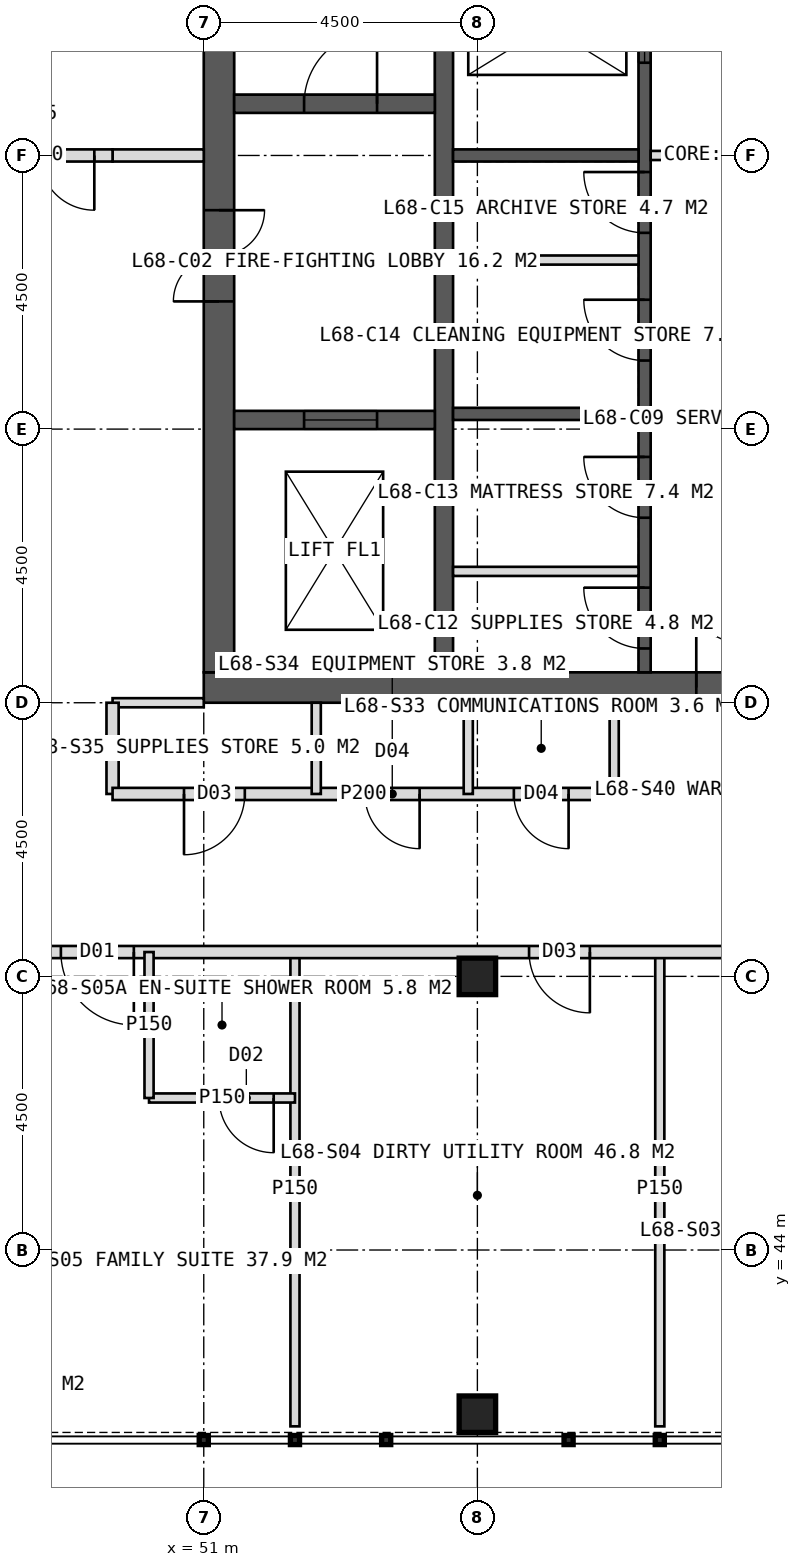
"""IFC4 building model, lengths in metres.
Left out: names, types, materials, properties, quantities, classifications, styles, units other than length and angle.
Written with IfcOpenShell. Run it as: python <this file> out.ifc"""

import sys

from ifc_helpers import new_model, si_unit, direction, frame, frame_2d, origin, origin_2d, place, context, subcontext, project, spatial, rectangle, hollow_rectangle, extrude, element, fill, save


model = new_model("IFC4")
c1 = context("Model", 3, precision=1e-05, world=origin(), true_north=direction((0.0, 1.0)))
c2 = subcontext(c1, "Body", "Model", "MODEL_VIEW")
j1 = project(units=[si_unit("LENGTHUNIT", "METRE"), si_unit("PLANEANGLEUNIT", "RADIAN")], contexts=[c1])
p1 = place(None, origin())
s1 = spatial("IfcSite", under=j1, at=p1, CompositionType="ELEMENT")
p2 = place(p1, origin())
s2 = spatial("IfcBuilding", under=s1, at=p2, CompositionType="ELEMENT")
p3 = place(p2, frame((0.0, 0.0, 282.0)))
s3 = spatial("IfcBuildingStorey", under=s2, at=p3, CompositionType="ELEMENT", Elevation=282.0)
p4 = place(p3, frame((51.0, 53.25, 0.0), z_axis=(0.0, 0.0, 1.0), x_axis=(1.0, 0.0, 0.0)))
e1 = element("IfcWall", 1, at=p4, inside=s3, PredefinedType="SHEAR", context=c2, shape_type="SweptSolid", body=[
    extrude(rectangle(XDim=18.0, YDim=0.5, at=frame_2d((9.0, 0.0))), origin(), (0.0, 0.0, 1.0), 4.0),
])
p5 = place(p4, frame((8.1, 0.0, 0.0)))
e2 = element("IfcOpeningElement", 2, at=p5, cuts=e1, PredefinedType="OPENING", context=c2, shape_type="SweptSolid", body=[
    extrude(rectangle(XDim=1.8, YDim=2.2, at=frame_2d((0.9, 1.1))), frame((0.0, 0.26, 0.0), z_axis=(0.0, -1.0, 0.0), x_axis=(1.0, 0.0, 0.0)), (0.0, 0.0, 1.0), 0.52),
])
p6 = place(p3, frame((51.25, 53.5, 0.0), z_axis=(0.0, 0.0, 1.0), x_axis=(0.0, 1.0, 0.0)))
e3 = element("IfcWall", 3, at=p6, inside=s3, PredefinedType="SHEAR", context=c2, shape_type="SweptSolid", body=[
    extrude(rectangle(XDim=17.0, YDim=0.5, at=frame_2d((8.5, 0.0))), origin(), (0.0, 0.0, 1.0), 4.0),
])
p7 = place(p6, frame((6.1, 0.0, 0.0)))
e4 = element("IfcOpeningElement", 4, at=p7, cuts=e3, PredefinedType="OPENING", context=c2, shape_type="SweptSolid", body=[
    extrude(rectangle(XDim=1.5, YDim=2.2, at=frame_2d((0.75, 1.1))), frame((0.0, 0.26, 0.0), z_axis=(0.0, -1.0, 0.0), x_axis=(1.0, 0.0, 0.0)), (0.0, 0.0, 1.0), 0.52),
])
p8 = place(p3, frame((54.95, 53.5, 0.0), z_axis=(0.0, 0.0, 1.0), x_axis=(0.0, 1.0, 0.0)))
e5 = element("IfcWall", 5, at=p8, inside=s3, PredefinedType="SHEAR", context=c2, shape_type="SweptSolid", body=[
    extrude(rectangle(XDim=17.0, YDim=0.3, at=frame_2d((8.5, 0.0))), origin(), (0.0, 0.0, 1.0), 4.0),
])
p9 = place(p3, frame((58.25, 53.5, 0.0), z_axis=(0.0, 0.0, 1.0), x_axis=(0.0, 1.0, 0.0)))
e6 = element("IfcWall", 6, at=p9, inside=s3, PredefinedType="SHEAR", context=c2, shape_type="SweptSolid", body=[
    extrude(rectangle(XDim=17.0, YDim=0.2, at=frame_2d((8.5, 0.0))), origin(), (0.0, 0.0, 1.0), 4.0),
])
p10 = place(p9, frame((0.393, 0.0, 0.0)))
e7 = element("IfcOpeningElement", 7, at=p10, cuts=e6, PredefinedType="OPENING", context=c2, shape_type="SweptSolid", body=[
    extrude(rectangle(XDim=1.0, YDim=2.1, at=frame_2d((0.5, 1.05))), frame((0.0, 0.11, 0.0), z_axis=(0.0, -1.0, 0.0), x_axis=(1.0, 0.0, 0.0)), (0.0, 0.0, 1.0), 0.22),
])
p11 = place(p9, frame((2.542, 0.0, 0.0)))
e8 = element("IfcOpeningElement", 8, at=p11, cuts=e6, PredefinedType="OPENING", context=c2, shape_type="SweptSolid", body=[
    extrude(rectangle(XDim=1.0, YDim=2.1, at=frame_2d((0.5, 1.05))), frame((0.0, 0.11, 0.0), z_axis=(0.0, -1.0, 0.0), x_axis=(1.0, 0.0, 0.0)), (0.0, 0.0, 1.0), 0.22),
])
p12 = place(p9, frame((5.127, 0.0, 0.0)))
e9 = element("IfcOpeningElement", 9, at=p12, cuts=e6, PredefinedType="OPENING", context=c2, shape_type="SweptSolid", body=[
    extrude(rectangle(XDim=1.0, YDim=2.1, at=frame_2d((0.5, 1.05))), frame((0.0, 0.11, 0.0), z_axis=(0.0, -1.0, 0.0), x_axis=(1.0, 0.0, 0.0)), (0.0, 0.0, 1.0), 0.22),
])
p13 = place(p9, frame((7.228, 0.0, 0.0)))
e10 = element("IfcOpeningElement", 10, at=p13, cuts=e6, PredefinedType="OPENING", context=c2, shape_type="SweptSolid", body=[
    extrude(rectangle(XDim=1.0, YDim=2.1, at=frame_2d((0.5, 1.05))), frame((0.0, 0.11, 0.0), z_axis=(0.0, -1.0, 0.0), x_axis=(1.0, 0.0, 0.0)), (0.0, 0.0, 1.0), 0.22),
])
p14 = place(p9, frame((10.025, 0.0, 0.0)))
e11 = element("IfcOpeningElement", 11, at=p14, cuts=e6, PredefinedType="OPENING", context=c2, shape_type="SweptSolid", body=[
    extrude(rectangle(XDim=1.4, YDim=2.2, at=frame_2d((0.7, 1.1))), frame((0.0, 0.11, 0.0), z_axis=(0.0, -1.0, 0.0), x_axis=(1.0, 0.0, 0.0)), (0.0, 0.0, 1.0), 0.22),
])
p15 = place(p9, frame((14.325, 0.0, 0.0)))
e12 = element("IfcOpeningElement", 12, at=p15, cuts=e6, PredefinedType="OPENING", context=c2, shape_type="SweptSolid", body=[
    extrude(rectangle(XDim=1.4, YDim=2.2, at=frame_2d((0.7, 1.1))), frame((0.0, 0.11, 0.0), z_axis=(0.0, -1.0, 0.0), x_axis=(1.0, 0.0, 0.0)), (0.0, 0.0, 1.0), 0.22),
])
for number, where, z_axis, x_axis in (
    (13, (55.1, 57.75, 0.0), (0.0, 0.0, 1.0), (1.0, 0.0, 0.0)),
    (14, (55.1, 62.0, 0.0), (0.0, 0.0, 1.0), (1.0, 0.0, 0.0)),
):
    element("IfcWall", number, at=place(p3, frame(where, z_axis=z_axis, x_axis=x_axis)), inside=s3, PredefinedType="SHEAR", context=c2, shape_type="SweptSolid", body=[
        extrude(rectangle(XDim=3.05, YDim=0.2, at=frame_2d((1.525, 0.0))), origin(), (0.0, 0.0, 1.0), 4.0),
    ])
p16 = place(p3, frame((51.5, 62.85, 0.0), z_axis=(0.0, 0.0, 1.0), x_axis=(1.0, 0.0, 0.0)))
e15 = element("IfcWall", 15, at=p16, inside=s3, PredefinedType="SHEAR", context=c2, shape_type="SweptSolid", body=[
    extrude(rectangle(XDim=3.3, YDim=0.3, at=frame_2d((1.65, 0.0))), origin(), (0.0, 0.0, 1.0), 4.0),
])
p17 = place(p16, frame((1.15, 0.0, 0.0)))
e16 = element("IfcOpeningElement", 16, at=p17, cuts=e15, PredefinedType="OPENING", context=c2, shape_type="SweptSolid", body=[
    extrude(rectangle(XDim=1.2, YDim=2.1, at=frame_2d((0.6, 1.05))), frame((0.0, 0.16, 0.0), z_axis=(0.0, -1.0, 0.0), x_axis=(1.0, 0.0, 0.0)), (0.0, 0.0, 1.0), 0.32),
])
p18 = place(p3, frame((51.5, 57.65, 0.0), z_axis=(0.0, 0.0, 1.0), x_axis=(1.0, 0.0, 0.0)))
e17 = element("IfcWall", 17, at=p18, inside=s3, PredefinedType="SHEAR", context=c2, shape_type="SweptSolid", body=[
    extrude(rectangle(XDim=3.3, YDim=0.3, at=frame_2d((1.65, 0.0))), origin(), (0.0, 0.0, 1.0), 4.0),
])
p19 = place(p18, frame((1.15, 0.0, 0.0)))
e18 = element("IfcOpeningElement", 18, at=p19, cuts=e17, PredefinedType="OPENING", context=c2, shape_type="SweptSolid", body=[
    extrude(rectangle(XDim=1.2, YDim=2.2, at=frame_2d((0.6, 1.1))), frame((0.0, 0.16, 0.0), z_axis=(0.0, -1.0, 0.0), x_axis=(1.0, 0.0, 0.0)), (0.0, 0.0, 1.0), 0.32),
])
for number, where, z_axis, x_axis in (
    (19, (55.5, 48.5, 0.0), (0.0, 0.0, 1.0), (1.0, 0.0, 0.0)),
    (20, (55.5, 41.3, 0.0), (0.0, 0.0, 1.0), (1.0, 0.0, 0.0)),
):
    element("IfcColumn", number, at=place(p3, frame(where, z_axis=z_axis, x_axis=x_axis)), inside=s3, PredefinedType="COLUMN", context=c2, shape_type="SweptSolid", body=[
        extrude(hollow_rectangle(XDim=0.6, YDim=0.6, WallThickness=0.04, at=origin_2d()), origin(), (0.0, 0.0, 1.0), 4.0),
    ])
p20 = place(p3, frame((51.0, 53.0, 0.0), z_axis=(0.0, 0.0, 1.0), x_axis=(-1.0, 0.0, 0.0)))
e21 = element("IfcWall", 21, at=p20, inside=s3, PredefinedType="PARTITIONING", context=c2, shape_type="SweptSolid", body=[
    extrude(rectangle(XDim=1.5, YDim=0.15, at=frame_2d((0.75, 0.0))), origin(), (0.0, 0.0, 1.0), 3.75),
])
p21 = place(p3, frame((51.0, 62.0, 0.0), z_axis=(0.0, 0.0, 1.0), x_axis=(-1.0, 0.0, 0.0)))
e22 = element("IfcWall", 22, at=p21, inside=s3, PredefinedType="SOLIDWALL", context=c2, shape_type="SweptSolid", body=[
    extrude(rectangle(XDim=1.5, YDim=0.2, at=frame_2d((0.75, 0.0))), origin(), (0.0, 0.0, 1.0), 2.75),
])
p22 = place(p3, frame((49.5, 51.5, 0.0), z_axis=(0.0, 0.0, 1.0), x_axis=(0.0, 1.0, 0.0)))
e23 = element("IfcWall", 23, at=p22, inside=s3, PredefinedType="PARTITIONING", context=c2, shape_type="SweptSolid", body=[
    extrude(rectangle(XDim=1.5, YDim=0.2, at=frame_2d((0.75, 0.0))), origin(), (0.0, 0.0, 1.0), 3.75),
])
for number, where, z_axis, x_axis in (
    (24, (58.5, 48.9, 0.0), (0.0, 0.0, 1.0), (0.0, -1.0, 0.0)),
    (25, (52.5, 48.9, 0.0), (0.0, 0.0, 1.0), (0.0, -1.0, 0.0)),
):
    element("IfcWall", number, at=place(p3, frame(where, z_axis=z_axis, x_axis=x_axis)), inside=s3, PredefinedType="PARTITIONING", context=c2, shape_type="SweptSolid", body=[
        extrude(rectangle(XDim=7.8, YDim=0.15, at=frame_2d((3.9, 0.0))), origin(), (0.0, 0.0, 1.0), 3.75),
    ])
p23 = place(p3, frame((73.1, 48.9, 0.0), z_axis=(0.0, 0.0, 1.0), x_axis=(-1.0, 0.0, 0.0)))
e26 = element("IfcWall", 26, at=p23, inside=s3, PredefinedType="PARTITIONING", context=c2, shape_type="SweptSolid", body=[
    extrude(rectangle(XDim=26.2, YDim=0.2, at=frame_2d((13.1, 0.0))), origin(), (0.0, 0.0, 1.0), 3.75),
])
p24 = place(p23, frame((1.75, 0.0, 0.0)))
e27 = element("IfcOpeningElement", 27, at=p24, cuts=e26, PredefinedType="OPENING", context=c2, shape_type="SweptSolid", body=[
    extrude(rectangle(XDim=1.2, YDim=2.2, at=frame_2d((0.6, 1.1))), frame((0.0, 0.11, 0.0), z_axis=(0.0, -1.0, 0.0), x_axis=(1.0, 0.0, 0.0)), (0.0, 0.0, 1.0), 0.22),
])
p25 = place(p23, frame((6.75, 0.0, 0.0)))
e28 = element("IfcOpeningElement", 28, at=p25, cuts=e26, PredefinedType="OPENING", context=c2, shape_type="SweptSolid", body=[
    extrude(rectangle(XDim=1.0, YDim=2.1, at=frame_2d((0.5, 1.05))), frame((0.0, 0.11, 0.0), z_axis=(0.0, -1.0, 0.0), x_axis=(1.0, 0.0, 0.0)), (0.0, 0.0, 1.0), 0.22),
])
p26 = place(p23, frame((11.85, 0.0, 0.0)))
e29 = element("IfcOpeningElement", 29, at=p26, cuts=e26, PredefinedType="OPENING", context=c2, shape_type="SweptSolid", body=[
    extrude(rectangle(XDim=1.0, YDim=2.1, at=frame_2d((0.5, 1.05))), frame((0.0, 0.11, 0.0), z_axis=(0.0, -1.0, 0.0), x_axis=(1.0, 0.0, 0.0)), (0.0, 0.0, 1.0), 0.22),
])
p27 = place(p23, frame((15.75, 0.0, 0.0)))
e30 = element("IfcOpeningElement", 30, at=p27, cuts=e26, PredefinedType="OPENING", context=c2, shape_type="SweptSolid", body=[
    extrude(rectangle(XDim=1.0, YDim=2.1, at=frame_2d((0.5, 1.05))), frame((0.0, 0.11, 0.0), z_axis=(0.0, -1.0, 0.0), x_axis=(1.0, 0.0, 0.0)), (0.0, 0.0, 1.0), 0.22),
])
p28 = place(p23, frame((23.25, 0.0, 0.0)))
e31 = element("IfcOpeningElement", 31, at=p28, cuts=e26, PredefinedType="OPENING", context=c2, shape_type="SweptSolid", body=[
    extrude(rectangle(XDim=1.2, YDim=2.2, at=frame_2d((0.6, 1.1))), frame((0.0, 0.11, 0.0), z_axis=(0.0, -1.0, 0.0), x_axis=(1.0, 0.0, 0.0)), (0.0, 0.0, 1.0), 0.22),
])
p29 = place(p3, frame((52.5, 46.5, 0.0), z_axis=(0.0, 0.0, 1.0), x_axis=(-1.0, 0.0, 0.0)))
e32 = element("IfcWall", 32, at=p29, inside=s3, PredefinedType="PARTITIONING", context=c2, shape_type="SweptSolid", body=[
    extrude(rectangle(XDim=2.4, YDim=0.15, at=frame_2d((1.2, 0.0))), origin(), (0.0, 0.0, 1.0), 3.75),
])
p30 = place(p29, frame((0.35, 0.0, 0.0)))
e33 = element("IfcOpeningElement", 33, at=p30, cuts=e32, PredefinedType="OPENING", context=c2, shape_type="SweptSolid", body=[
    extrude(rectangle(XDim=0.9, YDim=2.1, at=frame_2d((0.45, 1.05))), frame((0.0, 0.085, 0.0), z_axis=(0.0, -1.0, 0.0), x_axis=(1.0, 0.0, 0.0)), (0.0, 0.0, 1.0), 0.17),
])
p31 = place(p3, frame((50.1, 48.9, 0.0), z_axis=(0.0, 0.0, 1.0), x_axis=(0.0, -1.0, 0.0)))
e34 = element("IfcWall", 34, at=p31, inside=s3, PredefinedType="PARTITIONING", context=c2, shape_type="SweptSolid", body=[
    extrude(rectangle(XDim=2.4, YDim=0.15, at=frame_2d((1.2, 0.0))), origin(), (0.0, 0.0, 1.0), 3.75),
])
p32 = place(p3, frame((57.75, 51.5, 0.0), z_axis=(0.0, 0.0, 1.0), x_axis=(-1.0, 0.0, 0.0)))
e35 = element("IfcWall", 35, at=p32, inside=s3, PredefinedType="PARTITIONING", context=c2, shape_type="SweptSolid", body=[
    extrude(rectangle(XDim=8.25, YDim=0.2, at=frame_2d((4.125, 0.0))), origin(), (0.0, 0.0, 1.0), 3.75),
])
p33 = place(p32, frame((0.75, 0.0, 0.0)))
e36 = element("IfcOpeningElement", 36, at=p33, cuts=e35, PredefinedType="OPENING", context=c2, shape_type="SweptSolid", body=[
    extrude(rectangle(XDim=0.9, YDim=2.1, at=frame_2d((0.45, 1.05))), frame((0.0, 0.11, 0.0), z_axis=(0.0, -1.0, 0.0), x_axis=(1.0, 0.0, 0.0)), (0.0, 0.0, 1.0), 0.22),
])
p34 = place(p32, frame((3.2, 0.0, 0.0)))
e37 = element("IfcOpeningElement", 37, at=p34, cuts=e35, PredefinedType="OPENING", context=c2, shape_type="SweptSolid", body=[
    extrude(rectangle(XDim=0.9, YDim=2.1, at=frame_2d((0.45, 1.05))), frame((0.0, 0.11, 0.0), z_axis=(0.0, -1.0, 0.0), x_axis=(1.0, 0.0, 0.0)), (0.0, 0.0, 1.0), 0.22),
])
p35 = place(p32, frame((6.075, 0.0, 0.0)))
e38 = element("IfcOpeningElement", 38, at=p35, cuts=e35, PredefinedType="OPENING", context=c2, shape_type="SweptSolid", body=[
    extrude(rectangle(XDim=1.0, YDim=2.1, at=frame_2d((0.5, 1.05))), frame((0.0, 0.11, 0.0), z_axis=(0.0, -1.0, 0.0), x_axis=(1.0, 0.0, 0.0)), (0.0, 0.0, 1.0), 0.22),
])
p36 = place(p3, frame((57.75, 53.0, 0.0), z_axis=(0.0, 0.0, 1.0), x_axis=(0.0, -1.0, 0.0)))
e39 = element("IfcWall", 39, at=p36, inside=s3, PredefinedType="PARTITIONING", context=c2, shape_type="SweptSolid", body=[
    extrude(rectangle(XDim=1.5, YDim=0.15, at=frame_2d((0.75, 0.0))), origin(), (0.0, 0.0, 1.0), 3.75),
])
p37 = place(p3, frame((55.35, 53.0, 0.0), z_axis=(0.0, 0.0, 1.0), x_axis=(0.0, -1.0, 0.0)))
e40 = element("IfcWall", 40, at=p37, inside=s3, PredefinedType="PARTITIONING", context=c2, shape_type="SweptSolid", body=[
    extrude(rectangle(XDim=1.5, YDim=0.15, at=frame_2d((0.75, 0.0))), origin(), (0.0, 0.0, 1.0), 2.95),
])
p38 = place(p3, frame((52.85, 53.0, 0.0), z_axis=(0.0, 0.0, 1.0), x_axis=(0.0, -1.0, 0.0)))
e41 = element("IfcWall", 41, at=p38, inside=s3, PredefinedType="PARTITIONING", context=c2, shape_type="SweptSolid", body=[
    extrude(rectangle(XDim=1.5, YDim=0.15, at=frame_2d((0.75, 0.0))), origin(), (0.0, 0.0, 1.0), 3.75),
])
p39 = place(p3, frame((49.5, 62.0, 0.0), z_axis=(0.0, 0.0, 1.0), x_axis=(-1.0, 0.0, 0.0)))
e42 = element("IfcWall", 42, at=p39, inside=s3, PredefinedType="SOLIDWALL", context=c2, shape_type="SweptSolid", body=[
    extrude(rectangle(XDim=2.6, YDim=0.2, at=frame_2d((1.3, 0.0))), origin(), (0.0, 0.0, 1.0), 2.75),
])
p40 = place(p39, frame((0.3, 0.0, 0.0)))
e43 = element("IfcOpeningElement", 43, at=p40, cuts=e42, PredefinedType="OPENING", context=c2, shape_type="SweptSolid", body=[
    extrude(rectangle(XDim=1.8, YDim=2.2, at=frame_2d((0.9, 1.1))), frame((0.0, 0.11, 0.0), z_axis=(0.0, -1.0, 0.0), x_axis=(1.0, 0.0, 0.0)), (0.0, 0.0, 1.0), 0.22),
])
for number, where, z_axis, x_axis in (
    (44, (55.1, 55.16, 0.0), (0.0, 0.0, 1.0), (1.0, 0.0, 0.0)),
    (45, (55.1, 60.28, 0.0), (0.0, 0.0, 1.0), (1.0, 0.0, 0.0)),
):
    element("IfcWall", number, at=place(p3, frame(where, z_axis=z_axis, x_axis=x_axis)), inside=s3, PredefinedType="PARTITIONING", context=c2, shape_type="SweptSolid", body=[
        extrude(rectangle(XDim=3.05, YDim=0.15, at=frame_2d((1.525, 0.0))), origin(), (0.0, 0.0, 1.0), 3.75),
    ])
p41 = place(p3, frame((58.35, 62.0, 0.0), z_axis=(0.0, 0.0, 1.0), x_axis=(1.0, 0.0, 0.0)))
e46 = element("IfcWall", 46, at=p41, inside=s3, PredefinedType="PARTITIONING", context=c2, shape_type="SweptSolid", body=[
    extrude(rectangle(XDim=3.3, YDim=0.15, at=frame_2d((1.65, 0.0))), origin(), (0.0, 0.0, 1.0), 3.75),
])
p42 = place(p27, origin())
e47 = element("IfcDoor", 47, at=p42, inside=s3, OperationType="SINGLE_SWING_LEFT", PredefinedType="DOOR", context=c2, shape_type="SweptSolid", body=[
    extrude(rectangle(XDim=1.0, YDim=2.1, at=frame_2d((0.5, 1.05))), frame((0.0, 0.025, 0.0), z_axis=(0.0, -1.0, 0.0), x_axis=(1.0, 0.0, 0.0)), (0.0, 0.0, 1.0), 0.05),
])
fill(e30, e47)
p43 = place(p28, origin())
e48 = element("IfcDoor", 48, at=p43, inside=s3, OperationType="SINGLE_SWING_LEFT", PredefinedType="DOOR", context=c2, shape_type="SweptSolid", body=[
    extrude(rectangle(XDim=1.2, YDim=2.2, at=frame_2d((0.6, 1.1))), frame((0.0, 0.025, 0.0), z_axis=(0.0, -1.0, 0.0), x_axis=(1.0, 0.0, 0.0)), (0.0, 0.0, 1.0), 0.05),
])
fill(e31, e48)
p44 = place(p30, origin())
e49 = element("IfcDoor", 49, at=p44, inside=s3, OperationType="SINGLE_SWING_LEFT", PredefinedType="DOOR", context=c2, shape_type="SweptSolid", body=[
    extrude(rectangle(XDim=0.9, YDim=2.1, at=frame_2d((0.45, 1.05))), frame((0.0, 0.025, 0.0), z_axis=(0.0, -1.0, 0.0), x_axis=(1.0, 0.0, 0.0)), (0.0, 0.0, 1.0), 0.05),
])
fill(e33, e49)
p45 = place(p33, origin())
e50 = element("IfcDoor", 50, at=p45, inside=s3, OperationType="SINGLE_SWING_LEFT", PredefinedType="DOOR", context=c2, shape_type="SweptSolid", body=[
    extrude(rectangle(XDim=0.9, YDim=2.1, at=frame_2d((0.45, 1.05))), frame((0.0, 0.025, 0.0), z_axis=(0.0, -1.0, 0.0), x_axis=(1.0, 0.0, 0.0)), (0.0, 0.0, 1.0), 0.05),
])
fill(e36, e50)
p46 = place(p34, origin())
e51 = element("IfcDoor", 51, at=p46, inside=s3, OperationType="SINGLE_SWING_LEFT", PredefinedType="DOOR", context=c2, shape_type="SweptSolid", body=[
    extrude(rectangle(XDim=0.9, YDim=2.1, at=frame_2d((0.45, 1.05))), frame((0.0, 0.025, 0.0), z_axis=(0.0, -1.0, 0.0), x_axis=(1.0, 0.0, 0.0)), (0.0, 0.0, 1.0), 0.05),
])
fill(e37, e51)
p47 = place(p35, origin())
e52 = element("IfcDoor", 52, at=p47, inside=s3, OperationType="SINGLE_SWING_RIGHT", PredefinedType="DOOR", context=c2, shape_type="SweptSolid", body=[
    extrude(rectangle(XDim=1.0, YDim=2.1, at=frame_2d((0.5, 1.05))), frame((0.0, 0.025, 0.0), z_axis=(0.0, -1.0, 0.0), x_axis=(1.0, 0.0, 0.0)), (0.0, 0.0, 1.0), 0.05),
])
fill(e38, e52)
p48 = place(p40, origin())
e53 = element("IfcDoor", 53, at=p48, inside=s3, OperationType="DOUBLE_DOOR_DOUBLE_SWING", PredefinedType="DOOR", context=c2, shape_type="SweptSolid", body=[
    extrude(rectangle(XDim=1.8, YDim=2.2, at=frame_2d((0.9, 1.1))), frame((0.0, 0.025, 0.0), z_axis=(0.0, -1.0, 0.0), x_axis=(1.0, 0.0, 0.0)), (0.0, 0.0, 1.0), 0.05),
])
fill(e43, e53)
p49 = place(p7, origin())
e54 = element("IfcDoor", 54, at=p49, inside=s3, OperationType="DOUBLE_DOOR_SINGLE_SWING", PredefinedType="DOOR", context=c2, shape_type="SweptSolid", body=[
    extrude(rectangle(XDim=1.5, YDim=2.2, at=frame_2d((0.75, 1.1))), frame((0.0, 0.025, 0.0), z_axis=(0.0, -1.0, 0.0), x_axis=(1.0, 0.0, 0.0)), (0.0, 0.0, 1.0), 0.05),
])
fill(e4, e54)
p50 = place(p17, origin())
e55 = element("IfcDoor", 55, at=p50, inside=s3, OperationType="SINGLE_SWING_RIGHT", PredefinedType="DOOR", context=c2, shape_type="SweptSolid", body=[
    extrude(rectangle(XDim=1.2, YDim=2.1, at=frame_2d((0.6, 1.05))), frame((0.0, 0.025, 0.0), z_axis=(0.0, -1.0, 0.0), x_axis=(1.0, 0.0, 0.0)), (0.0, 0.0, 1.0), 0.05),
])
fill(e16, e55)
p51 = place(p19, origin())
e56 = element("IfcDoor", 56, at=p51, inside=s3, OperationType="SLIDING_TO_LEFT", PredefinedType="DOOR", context=c2, shape_type="SweptSolid", body=[
    extrude(rectangle(XDim=1.2, YDim=2.2, at=frame_2d((0.6, 1.1))), frame((0.0, 0.025, 0.0), z_axis=(0.0, -1.0, 0.0), x_axis=(1.0, 0.0, 0.0)), (0.0, 0.0, 1.0), 0.05),
])
fill(e18, e56)
p52 = place(p10, origin())
e57 = element("IfcDoor", 57, at=p52, inside=s3, OperationType="SINGLE_SWING_RIGHT", PredefinedType="DOOR", context=c2, shape_type="SweptSolid", body=[
    extrude(rectangle(XDim=1.0, YDim=2.1, at=frame_2d((0.5, 1.05))), frame((0.0, 0.025, 0.0), z_axis=(0.0, -1.0, 0.0), x_axis=(1.0, 0.0, 0.0)), (0.0, 0.0, 1.0), 0.05),
])
fill(e7, e57)
p53 = place(p11, origin())
e58 = element("IfcDoor", 58, at=p53, inside=s3, OperationType="SINGLE_SWING_RIGHT", PredefinedType="DOOR", context=c2, shape_type="SweptSolid", body=[
    extrude(rectangle(XDim=1.0, YDim=2.1, at=frame_2d((0.5, 1.05))), frame((0.0, 0.025, 0.0), z_axis=(0.0, -1.0, 0.0), x_axis=(1.0, 0.0, 0.0)), (0.0, 0.0, 1.0), 0.05),
])
fill(e8, e58)
p54 = place(p12, origin())
e59 = element("IfcDoor", 59, at=p54, inside=s3, OperationType="SINGLE_SWING_RIGHT", PredefinedType="DOOR", context=c2, shape_type="SweptSolid", body=[
    extrude(rectangle(XDim=1.0, YDim=2.1, at=frame_2d((0.5, 1.05))), frame((0.0, 0.025, 0.0), z_axis=(0.0, -1.0, 0.0), x_axis=(1.0, 0.0, 0.0)), (0.0, 0.0, 1.0), 0.05),
])
fill(e9, e59)
p55 = place(p13, origin())
e60 = element("IfcDoor", 60, at=p55, inside=s3, OperationType="SINGLE_SWING_RIGHT", PredefinedType="DOOR", context=c2, shape_type="SweptSolid", body=[
    extrude(rectangle(XDim=1.0, YDim=2.1, at=frame_2d((0.5, 1.05))), frame((0.0, 0.025, 0.0), z_axis=(0.0, -1.0, 0.0), x_axis=(1.0, 0.0, 0.0)), (0.0, 0.0, 1.0), 0.05),
])
fill(e10, e60)
p56 = place(p14, origin())
e61 = element("IfcDoor", 61, at=p56, inside=s3, OperationType="SLIDING_TO_LEFT", PredefinedType="DOOR", context=c2, shape_type="SweptSolid", body=[
    extrude(rectangle(XDim=1.4, YDim=2.2, at=frame_2d((0.7, 1.1))), frame((0.0, 0.025, 0.0), z_axis=(0.0, -1.0, 0.0), x_axis=(1.0, 0.0, 0.0)), (0.0, 0.0, 1.0), 0.05),
])
fill(e11, e61)
p57 = place(p5, origin())
e62 = element("IfcDoor", 62, at=p57, inside=s3, OperationType="DOUBLE_DOOR_SINGLE_SWING", PredefinedType="DOOR", context=c2, shape_type="SweptSolid", body=[
    extrude(rectangle(XDim=1.8, YDim=2.2, at=frame_2d((0.9, 1.1))), frame((0.0, 0.025, 0.0), z_axis=(0.0, -1.0, 0.0), x_axis=(1.0, 0.0, 0.0)), (0.0, 0.0, 1.0), 0.05),
])
fill(e2, e62)
save(model, sys.argv[1])
